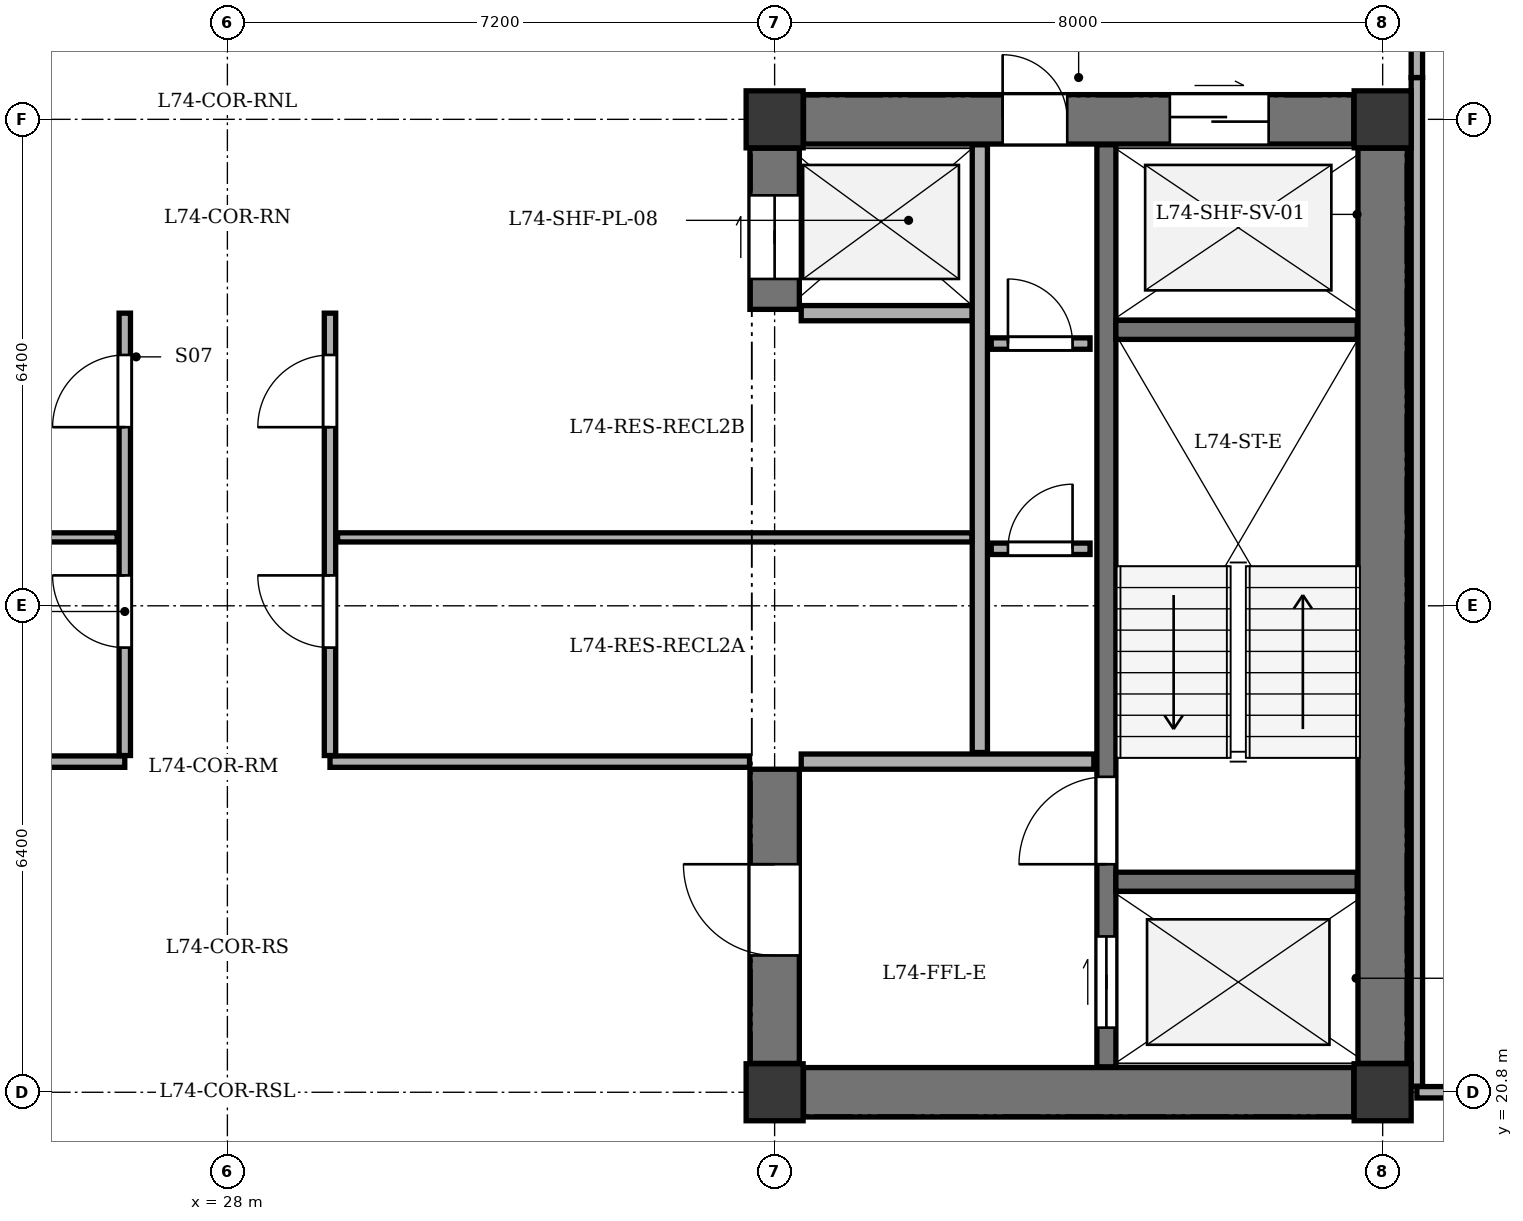
"""IFC4 building model, lengths in metres.
Left out: names, types, materials, properties, quantities, classifications, styles, units other than length and angle.
Written with IfcOpenShell. Run it as: python <this file> out.ifc"""

import sys

from ifc_helpers import new_model, si_unit, direction, frame, frame_2d, origin, origin_2d, place, context, subcontext, project, spatial, rectangle, extrude, element, fill, save


model = new_model("IFC4")
c1 = context("Model", 3, precision=1e-05, world=origin(), true_north=direction((0.0, 1.0)))
c2 = subcontext(c1, "Body", "Model", "MODEL_VIEW")
j1 = project(units=[si_unit("LENGTHUNIT", "METRE"), si_unit("PLANEANGLEUNIT", "RADIAN")], contexts=[c1])
p1 = place(None, origin())
s1 = spatial("IfcSite", under=j1, at=p1, CompositionType="ELEMENT")
p2 = place(p1, origin())
s2 = spatial("IfcBuilding", under=s1, at=p2, CompositionType="ELEMENT")
p3 = place(p2, frame((0.0, 0.0, 278.9)))
s3 = spatial("IfcBuildingStorey", under=s2, at=p3, CompositionType="ELEMENT", Elevation=278.9)
for number, where, z_axis, x_axis in (
    (1, (35.2, 20.8, 0.0), (0.0, 0.0, 1.0), (1.0, 0.0, 0.0)),
    (2, (43.2, 20.8, 0.0), (0.0, 0.0, 1.0), (1.0, 0.0, 0.0)),
    (3, (35.2, 33.6, 0.0), (0.0, 0.0, 1.0), (1.0, 0.0, 0.0)),
    (4, (43.2, 33.6, 0.0), (0.0, 0.0, 1.0), (1.0, 0.0, 0.0)),
):
    element("IfcColumn", number, at=place(p3, frame(where, z_axis=z_axis, x_axis=x_axis)), inside=s3, PredefinedType="COLUMN", context=c2, shape_type="SweptSolid", body=[
        extrude(rectangle(XDim=0.75, YDim=0.75, at=origin_2d()), origin(), (0.0, 0.0, 1.0), 3.4),
    ])
p4 = place(p3, frame((43.2, 21.18, 0.0), z_axis=(0.0, 0.0, 1.0), x_axis=(0.0, 1.0, 0.0)))
e5 = element("IfcWall", 5, at=p4, inside=s3, PredefinedType="SHEAR", context=c2, shape_type="SweptSolid", body=[
    extrude(rectangle(XDim=12.04, YDim=0.65, at=frame_2d((6.02, 0.0))), origin(), (0.0, 0.0, 1.0), 2.95),
])
p5 = place(p3, frame((35.58, 20.8, 0.0), z_axis=(0.0, 0.0, 1.0), x_axis=(1.0, 0.0, 0.0)))
e6 = element("IfcWall", 6, at=p5, inside=s3, PredefinedType="SHEAR", context=c2, shape_type="SweptSolid", body=[
    extrude(rectangle(XDim=7.24, YDim=0.65, at=frame_2d((3.62, 0.0))), origin(), (0.0, 0.0, 1.0), 2.95),
])
p6 = place(p3, frame((35.58, 33.6, 0.0), z_axis=(0.0, 0.0, 1.0), x_axis=(1.0, 0.0, 0.0)))
e7 = element("IfcWall", 7, at=p6, inside=s3, PredefinedType="SHEAR", context=c2, shape_type="SweptSolid", body=[
    extrude(rectangle(XDim=7.24, YDim=0.65, at=frame_2d((3.62, 0.0))), origin(), (0.0, 0.0, 1.0), 2.95),
])
p7 = place(p6, frame((4.82, 0.0, 0.0)))
e8 = element("IfcOpeningElement", 8, at=p7, cuts=e7, PredefinedType="OPENING", context=c2, shape_type="SweptSolid", body=[
    extrude(rectangle(XDim=1.3, YDim=2.15, at=frame_2d((0.65, 1.075))), frame((0.0, 0.335, 0.0), z_axis=(0.0, -1.0, 0.0), x_axis=(1.0, 0.0, 0.0)), (0.0, 0.0, 1.0), 0.67),
])
p8 = place(p6, frame((2.62, 0.0, 0.0)))
e9 = element("IfcOpeningElement", 9, at=p8, cuts=e7, PredefinedType="OPENING", context=c2, shape_type="SweptSolid", body=[
    extrude(rectangle(XDim=0.85, YDim=2.02, at=frame_2d((0.425, 1.01))), frame((0.0, 0.335, 0.0), z_axis=(0.0, -1.0, 0.0), x_axis=(1.0, 0.0, 0.0)), (0.0, 0.0, 1.0), 0.67),
])
p9 = place(p3, frame((35.2, 21.18, 0.0), z_axis=(0.0, 0.0, 1.0), x_axis=(0.0, 1.0, 0.0)))
e10 = element("IfcWall", 10, at=p9, inside=s3, PredefinedType="SHEAR", context=c2, shape_type="SweptSolid", body=[
    extrude(rectangle(XDim=3.87, YDim=0.65, at=frame_2d((1.935, 0.0))), origin(), (0.0, 0.0, 1.0), 2.95),
])
p10 = place(p9, frame((1.42, 0.0, 0.0)))
e11 = element("IfcOpeningElement", 11, at=p10, cuts=e10, PredefinedType="OPENING", context=c2, shape_type="SweptSolid", body=[
    extrude(rectangle(XDim=1.2, YDim=2.15, at=frame_2d((0.6, 1.075))), frame((0.0, 0.335, 0.0), z_axis=(0.0, -1.0, 0.0), x_axis=(1.0, 0.0, 0.0)), (0.0, 0.0, 1.0), 0.67),
])
p11 = place(p3, frame((35.2, 31.1, 0.0), z_axis=(0.0, 0.0, 1.0), x_axis=(0.0, 1.0, 0.0)))
e12 = element("IfcWall", 12, at=p11, inside=s3, PredefinedType="SHEAR", context=c2, shape_type="SweptSolid", body=[
    extrude(rectangle(XDim=2.12, YDim=0.65, at=frame_2d((1.06, 0.0))), origin(), (0.0, 0.0, 1.0), 2.95),
])
p12 = place(p11, frame((0.4, 0.0, 0.0)))
e13 = element("IfcOpeningElement", 13, at=p12, cuts=e12, PredefinedType="OPENING", context=c2, shape_type="SweptSolid", body=[
    extrude(rectangle(XDim=1.1, YDim=2.1, at=frame_2d((0.55, 1.05))), frame((0.0, 0.335, 0.0), z_axis=(0.0, -1.0, 0.0), x_axis=(1.0, 0.0, 0.0)), (0.0, 0.0, 1.0), 0.67),
])
p13 = place(p3, frame((39.565, 21.135, 0.0), z_axis=(0.0, 0.0, 1.0), x_axis=(0.0, 1.0, 0.0)))
e14 = element("IfcWall", 14, at=p13, inside=s3, PredefinedType="SHEAR", context=c2, shape_type="SweptSolid", body=[
    extrude(rectangle(XDim=12.13, YDim=0.25, at=frame_2d((6.065, 0.0))), origin(), (0.0, 0.0, 1.0), 2.95),
])
p14 = place(p13, frame((0.515, 0.0, 0.0)))
e15 = element("IfcOpeningElement", 15, at=p14, cuts=e14, PredefinedType="OPENING", context=c2, shape_type="SweptSolid", body=[
    extrude(rectangle(XDim=1.2, YDim=2.15, at=frame_2d((0.6, 1.075))), frame((0.0, 0.135, 0.0), z_axis=(0.0, -1.0, 0.0), x_axis=(1.0, 0.0, 0.0)), (0.0, 0.0, 1.0), 0.27),
])
p15 = place(p13, frame((2.665, 0.0, 0.0)))
e16 = element("IfcOpeningElement", 16, at=p15, cuts=e14, PredefinedType="OPENING", context=c2, shape_type="SweptSolid", body=[
    extrude(rectangle(XDim=1.15, YDim=2.15, at=frame_2d((0.575, 1.075))), frame((0.0, 0.135, 0.0), z_axis=(0.0, -1.0, 0.0), x_axis=(1.0, 0.0, 0.0)), (0.0, 0.0, 1.0), 0.27),
])
for number, where, z_axis, x_axis in (
    (17, (39.69, 23.57, 0.0), (0.0, 0.0, 1.0), (1.0, 0.0, 0.0)),
    (18, (39.69, 30.83, 0.0), (0.0, 0.0, 1.0), (1.0, 0.0, 0.0)),
):
    element("IfcWall", number, at=place(p3, frame(where, z_axis=z_axis, x_axis=x_axis)), inside=s3, PredefinedType="SHEAR", context=c2, shape_type="SweptSolid", body=[
        extrude(rectangle(XDim=3.175, YDim=0.25, at=frame_2d((1.587, 0.0))), origin(), (0.0, 0.0, 1.0), 2.95),
    ])
p16 = place(p3, frame((35.55, 25.15, 0.0), z_axis=(0.0, 0.0, 1.0), x_axis=(1.0, 0.0, 0.0)))
e19 = element("IfcWall", 19, at=p16, inside=s3, PredefinedType="SOLIDWALL", context=c2, shape_type="SweptSolid", body=[
    extrude(rectangle(XDim=3.85, YDim=0.2, at=frame_2d((1.925, 0.0))), origin(), (0.0, 0.0, 1.0), 2.95),
])
p17 = place(p3, frame((35.55, 31.05, 0.0), z_axis=(0.0, 0.0, 1.0), x_axis=(1.0, 0.0, 0.0)))
e20 = element("IfcWall", 20, at=p17, inside=s3, PredefinedType="SOLIDWALL", context=c2, shape_type="SweptSolid", body=[
    extrude(rectangle(XDim=2.25, YDim=0.2, at=frame_2d((1.125, 0.0))), origin(), (0.0, 0.0, 1.0), 2.95),
])
p18 = place(p3, frame((37.9, 25.27, 0.0), z_axis=(0.0, 0.0, 1.0), x_axis=(0.0, 1.0, 0.0)))
e21 = element("IfcWall", 21, at=p18, inside=s3, PredefinedType="SOLIDWALL", context=c2, shape_type="SweptSolid", body=[
    extrude(rectangle(XDim=7.995, YDim=0.2, at=frame_2d((3.998, 0.0))), origin(), (0.0, 0.0, 1.0), 2.95),
])
p19 = place(p3, frame((38.05, 27.95, 0.0), z_axis=(0.0, 0.0, 1.0), x_axis=(1.0, 0.0, 0.0)))
e22 = element("IfcWall", 22, at=p19, inside=s3, PredefinedType="PARTITIONING", context=c2, shape_type="SweptSolid", body=[
    extrude(rectangle(XDim=1.3, YDim=0.15, at=frame_2d((0.65, 0.0))), origin(), (0.0, 0.0, 1.0), 2.95),
])
p20 = place(p19, frame((0.22, 0.0, 0.0)))
e23 = element("IfcOpeningElement", 23, at=p20, cuts=e22, PredefinedType="OPENING", context=c2, shape_type="SweptSolid", body=[
    extrude(rectangle(XDim=0.85, YDim=2.02, at=frame_2d((0.425, 1.01))), frame((0.0, 0.085, 0.0), z_axis=(0.0, -1.0, 0.0), x_axis=(1.0, 0.0, 0.0)), (0.0, 0.0, 1.0), 0.17),
])
p21 = place(p3, frame((38.05, 30.65, 0.0), z_axis=(0.0, 0.0, 1.0), x_axis=(1.0, 0.0, 0.0)))
e24 = element("IfcWall", 24, at=p21, inside=s3, PredefinedType="PARTITIONING", context=c2, shape_type="SweptSolid", body=[
    extrude(rectangle(XDim=1.3, YDim=0.15, at=frame_2d((0.65, 0.0))), origin(), (0.0, 0.0, 1.0), 2.95),
])
p22 = place(p21, frame((0.22, 0.0, 0.0)))
e25 = element("IfcOpeningElement", 25, at=p22, cuts=e24, PredefinedType="OPENING", context=c2, shape_type="SweptSolid", body=[
    extrude(rectangle(XDim=0.85, YDim=2.02, at=frame_2d((0.425, 1.01))), frame((0.0, 0.085, 0.0), z_axis=(0.0, -1.0, 0.0), x_axis=(1.0, 0.0, 0.0)), (0.0, 0.0, 1.0), 0.17),
])
for number, where, z_axis, x_axis in (
    (26, (21.13, 25.15, 0.0), (0.0, 0.0, 1.0), (1.0, 0.0, 0.0)),
    (27, (29.35, 25.15, 0.0), (0.0, 0.0, 1.0), (1.0, 0.0, 0.0)),
):
    element("IfcWall", number, at=place(p3, frame(where, z_axis=z_axis, x_axis=x_axis)), inside=s3, PredefinedType="PARTITIONING", context=c2, shape_type="SweptSolid", body=[
        extrude(rectangle(XDim=5.52, YDim=0.15, at=frame_2d((2.76, 0.0))), origin(), (0.0, 0.0, 1.0), 2.95),
    ])
p23 = place(p3, frame((26.65, 25.23, 0.0), z_axis=(0.0, 0.0, 1.0), x_axis=(0.0, 1.0, 0.0)))
e28 = element("IfcWall", 28, at=p23, inside=s3, PredefinedType="PARTITIONING", context=c2, shape_type="SweptSolid", body=[
    extrude(rectangle(XDim=5.82, YDim=0.15, at=frame_2d((2.91, 0.0))), origin(), (0.0, 0.0, 1.0), 2.95),
])
p24 = place(p23, frame((1.42, 0.0, 0.0)))
e29 = element("IfcOpeningElement", 29, at=p24, cuts=e28, PredefinedType="OPENING", context=c2, shape_type="SweptSolid", body=[
    extrude(rectangle(XDim=0.95, YDim=2.1, at=frame_2d((0.475, 1.05))), frame((0.0, 0.085, 0.0), z_axis=(0.0, -1.0, 0.0), x_axis=(1.0, 0.0, 0.0)), (0.0, 0.0, 1.0), 0.17),
])
p25 = place(p23, frame((4.32, 0.0, 0.0)))
e30 = element("IfcOpeningElement", 30, at=p25, cuts=e28, PredefinedType="OPENING", context=c2, shape_type="SweptSolid", body=[
    extrude(rectangle(XDim=0.95, YDim=2.1, at=frame_2d((0.475, 1.05))), frame((0.0, 0.085, 0.0), z_axis=(0.0, -1.0, 0.0), x_axis=(1.0, 0.0, 0.0)), (0.0, 0.0, 1.0), 0.17),
])
p26 = place(p3, frame((16.7, 28.1, 0.0), z_axis=(0.0, 0.0, 1.0), x_axis=(1.0, 0.0, 0.0)))
e31 = element("IfcWall", 31, at=p26, inside=s3, PredefinedType="PARTITIONING", context=c2, shape_type="SweptSolid", body=[
    extrude(rectangle(XDim=9.85, YDim=0.12, at=frame_2d((4.925, 0.0))), origin(), (0.0, 0.0, 1.0), 2.95),
])
p27 = place(p3, frame((29.35, 25.23, 0.0), z_axis=(0.0, 0.0, 1.0), x_axis=(0.0, 1.0, 0.0)))
e32 = element("IfcWall", 32, at=p27, inside=s3, PredefinedType="PARTITIONING", context=c2, shape_type="SweptSolid", body=[
    extrude(rectangle(XDim=5.82, YDim=0.15, at=frame_2d((2.91, 0.0))), origin(), (0.0, 0.0, 1.0), 2.95),
])
p28 = place(p27, frame((1.42, 0.0, 0.0)))
e33 = element("IfcOpeningElement", 33, at=p28, cuts=e32, PredefinedType="OPENING", context=c2, shape_type="SweptSolid", body=[
    extrude(rectangle(XDim=0.95, YDim=2.1, at=frame_2d((0.475, 1.05))), frame((0.0, 0.085, 0.0), z_axis=(0.0, -1.0, 0.0), x_axis=(1.0, 0.0, 0.0)), (0.0, 0.0, 1.0), 0.17),
])
p29 = place(p27, frame((4.32, 0.0, 0.0)))
e34 = element("IfcOpeningElement", 34, at=p29, cuts=e32, PredefinedType="OPENING", context=c2, shape_type="SweptSolid", body=[
    extrude(rectangle(XDim=0.95, YDim=2.1, at=frame_2d((0.475, 1.05))), frame((0.0, 0.085, 0.0), z_axis=(0.0, -1.0, 0.0), x_axis=(1.0, 0.0, 0.0)), (0.0, 0.0, 1.0), 0.17),
])
p30 = place(p3, frame((29.45, 28.1, 0.0), z_axis=(0.0, 0.0, 1.0), x_axis=(1.0, 0.0, 0.0)))
e35 = element("IfcWall", 35, at=p30, inside=s3, PredefinedType="PARTITIONING", context=c2, shape_type="SweptSolid", body=[
    extrude(rectangle(XDim=8.345, YDim=0.12, at=frame_2d((4.172, 0.0))), origin(), (0.0, 0.0, 1.0), 2.95),
])
p31 = place(p3, frame((43.65, 20.8, 0.0), z_axis=(0.0, 0.0, 1.0), x_axis=(1.0, 0.0, 0.0)))
e36 = element("IfcWall", 36, at=p31, inside=s3, PredefinedType="PARTITIONING", context=c2, shape_type="SweptSolid", body=[
    extrude(rectangle(XDim=5.305, YDim=0.15, at=frame_2d((2.653, 0.0))), origin(), (0.0, 0.0, 1.0), 2.385),
])
p32 = place(p3, frame((43.65, 20.88, 0.0), z_axis=(0.0, 0.0, 1.0), x_axis=(0.0, 1.0, 0.0)))
e37 = element("IfcWall", 37, at=p32, inside=s3, PredefinedType="PARTITIONING", context=c2, shape_type="SweptSolid", body=[
    extrude(rectangle(XDim=13.27, YDim=0.15, at=frame_2d((6.635, 0.0))), origin(), (0.0, 0.0, 1.0), 2.95),
])
p33 = place(p3, frame((43.65, 34.15, 0.0), z_axis=(0.0, 0.0, 1.0), x_axis=(0.0, 1.0, 0.0)))
e38 = element("IfcWall", 38, at=p33, inside=s3, PredefinedType="PARTITIONING", context=c2, shape_type="SweptSolid", body=[
    extrude(rectangle(XDim=1.79, YDim=0.15, at=frame_2d((0.895, 0.0))), origin(), (0.0, 0.0, 1.0), 2.95),
])
p34 = place(p33, frame((0.63, 0.0, 0.0)))
e39 = element("IfcOpeningElement", 39, at=p34, cuts=e38, PredefinedType="OPENING", context=c2, shape_type="SweptSolid", body=[
    extrude(rectangle(XDim=0.95, YDim=2.1, at=frame_2d((0.475, 1.05))), frame((0.0, 0.085, 0.0), z_axis=(0.0, -1.0, 0.0), x_axis=(1.0, 0.0, 0.0)), (0.0, 0.0, 1.0), 0.17),
])
p35 = place(p7, origin())
e40 = element("IfcDoor", 40, at=p35, inside=s3, OperationType="DOUBLE_DOOR_SLIDING", PredefinedType="DOOR", context=c2, shape_type="SweptSolid", body=[
    extrude(rectangle(XDim=1.3, YDim=2.15, at=frame_2d((0.65, 1.075))), frame((0.0, 0.025, 0.0), z_axis=(0.0, -1.0, 0.0), x_axis=(1.0, 0.0, 0.0)), (0.0, 0.0, 1.0), 0.05),
])
fill(e8, e40)
p36 = place(p8, origin())
e41 = element("IfcDoor", 41, at=p36, inside=s3, OperationType="SINGLE_SWING_LEFT", PredefinedType="DOOR", context=c2, shape_type="SweptSolid", body=[
    extrude(rectangle(XDim=0.85, YDim=2.02, at=frame_2d((0.425, 1.01))), frame((0.0, 0.025, 0.0), z_axis=(0.0, -1.0, 0.0), x_axis=(1.0, 0.0, 0.0)), (0.0, 0.0, 1.0), 0.05),
])
fill(e9, e41)
p37 = place(p10, origin())
e42 = element("IfcDoor", 42, at=p37, inside=s3, OperationType="SINGLE_SWING_RIGHT", PredefinedType="DOOR", context=c2, shape_type="SweptSolid", body=[
    extrude(rectangle(XDim=1.2, YDim=2.15, at=frame_2d((0.6, 1.075))), frame((0.0, 0.025, 0.0), z_axis=(0.0, -1.0, 0.0), x_axis=(1.0, 0.0, 0.0)), (0.0, 0.0, 1.0), 0.05),
])
fill(e11, e42)
p38 = place(p12, origin())
e43 = element("IfcDoor", 43, at=p38, inside=s3, OperationType="DOUBLE_DOOR_SLIDING", PredefinedType="DOOR", context=c2, shape_type="SweptSolid", body=[
    extrude(rectangle(XDim=1.1, YDim=2.1, at=frame_2d((0.55, 1.05))), frame((0.0, 0.025, 0.0), z_axis=(0.0, -1.0, 0.0), x_axis=(1.0, 0.0, 0.0)), (0.0, 0.0, 1.0), 0.05),
])
fill(e13, e43)
p39 = place(p14, origin())
e44 = element("IfcDoor", 44, at=p39, inside=s3, OperationType="DOUBLE_DOOR_SLIDING", PredefinedType="DOOR", context=c2, shape_type="SweptSolid", body=[
    extrude(rectangle(XDim=1.2, YDim=2.15, at=frame_2d((0.6, 1.075))), frame((0.0, 0.025, 0.0), z_axis=(0.0, -1.0, 0.0), x_axis=(1.0, 0.0, 0.0)), (0.0, 0.0, 1.0), 0.05),
])
fill(e15, e44)
p40 = place(p15, origin())
e45 = element("IfcDoor", 45, at=p40, inside=s3, OperationType="SINGLE_SWING_LEFT", PredefinedType="DOOR", context=c2, shape_type="SweptSolid", body=[
    extrude(rectangle(XDim=1.15, YDim=2.15, at=frame_2d((0.575, 1.075))), frame((0.0, 0.025, 0.0), z_axis=(0.0, -1.0, 0.0), x_axis=(1.0, 0.0, 0.0)), (0.0, 0.0, 1.0), 0.05),
])
fill(e16, e45)
p41 = place(p20, origin())
e46 = element("IfcDoor", 46, at=p41, inside=s3, OperationType="SINGLE_SWING_RIGHT", PredefinedType="DOOR", context=c2, shape_type="SweptSolid", body=[
    extrude(rectangle(XDim=0.85, YDim=2.02, at=frame_2d((0.425, 1.01))), frame((0.0, 0.025, 0.0), z_axis=(0.0, -1.0, 0.0), x_axis=(1.0, 0.0, 0.0)), (0.0, 0.0, 1.0), 0.05),
])
fill(e23, e46)
p42 = place(p22, origin())
e47 = element("IfcDoor", 47, at=p42, inside=s3, OperationType="SINGLE_SWING_LEFT", PredefinedType="DOOR", context=c2, shape_type="SweptSolid", body=[
    extrude(rectangle(XDim=0.85, YDim=2.02, at=frame_2d((0.425, 1.01))), frame((0.0, 0.025, 0.0), z_axis=(0.0, -1.0, 0.0), x_axis=(1.0, 0.0, 0.0)), (0.0, 0.0, 1.0), 0.05),
])
fill(e25, e47)
p43 = place(p24, origin())
e48 = element("IfcDoor", 48, at=p43, inside=s3, OperationType="SINGLE_SWING_RIGHT", PredefinedType="DOOR", context=c2, shape_type="SweptSolid", body=[
    extrude(rectangle(XDim=0.95, YDim=2.1, at=frame_2d((0.475, 1.05))), frame((0.0, 0.025, 0.0), z_axis=(0.0, -1.0, 0.0), x_axis=(1.0, 0.0, 0.0)), (0.0, 0.0, 1.0), 0.05),
])
fill(e29, e48)
p44 = place(p25, origin())
e49 = element("IfcDoor", 49, at=p44, inside=s3, OperationType="SINGLE_SWING_LEFT", PredefinedType="DOOR", context=c2, shape_type="SweptSolid", body=[
    extrude(rectangle(XDim=0.95, YDim=2.1, at=frame_2d((0.475, 1.05))), frame((0.0, 0.025, 0.0), z_axis=(0.0, -1.0, 0.0), x_axis=(1.0, 0.0, 0.0)), (0.0, 0.0, 1.0), 0.05),
])
fill(e30, e49)
p45 = place(p28, origin())
e50 = element("IfcDoor", 50, at=p45, inside=s3, OperationType="SINGLE_SWING_RIGHT", PredefinedType="DOOR", context=c2, shape_type="SweptSolid", body=[
    extrude(rectangle(XDim=0.95, YDim=2.1, at=frame_2d((0.475, 1.05))), frame((0.0, 0.025, 0.0), z_axis=(0.0, -1.0, 0.0), x_axis=(1.0, 0.0, 0.0)), (0.0, 0.0, 1.0), 0.05),
])
fill(e33, e50)
p46 = place(p29, origin())
e51 = element("IfcDoor", 51, at=p46, inside=s3, OperationType="SINGLE_SWING_LEFT", PredefinedType="DOOR", context=c2, shape_type="SweptSolid", body=[
    extrude(rectangle(XDim=0.95, YDim=2.1, at=frame_2d((0.475, 1.05))), frame((0.0, 0.025, 0.0), z_axis=(0.0, -1.0, 0.0), x_axis=(1.0, 0.0, 0.0)), (0.0, 0.0, 1.0), 0.05),
])
fill(e34, e51)
save(model, sys.argv[1])
